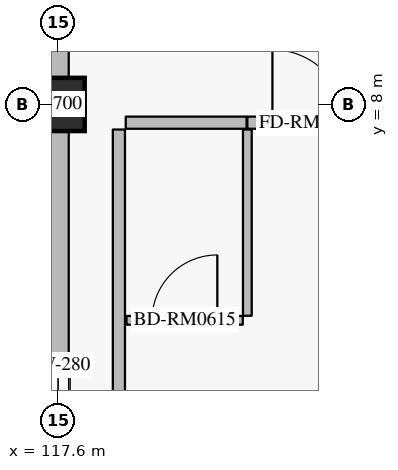
"""IFC4 building model, lengths in metres.
Left out: names, types, materials, properties, quantities, classifications, styles, units other than length and angle.
Written with IfcOpenShell. Run it as: python <this file> out.ifc"""

import sys

from ifc_helpers import new_model, si_unit, direction, frame, frame_2d, origin, origin_2d, place, context, subcontext, project, spatial, rectangle, extrude, element, fill, save


model = new_model("IFC4")
c1 = context("Model", 3, precision=1e-05, world=origin(), true_north=direction((0.0, 1.0)))
c2 = subcontext(c1, "Body", "Model", "MODEL_VIEW")
j1 = project(units=[si_unit("LENGTHUNIT", "METRE"), si_unit("PLANEANGLEUNIT", "RADIAN")], contexts=[c1])
p1 = place(None, origin())
s1 = spatial("IfcSite", under=j1, at=p1, CompositionType="ELEMENT")
p2 = place(p1, origin())
s2 = spatial("IfcBuilding", under=s1, at=p2, CompositionType="ELEMENT")
p3 = place(p2, frame((0.0, 0.0, 25.2)))
s3 = spatial("IfcBuildingStorey", under=s2, at=p3, CompositionType="ELEMENT", Elevation=25.2)
p4 = place(p3, frame((117.6, 8.0, 0.0), z_axis=(0.0, 0.0, 1.0), x_axis=(1.0, 0.0, 0.0)))
e1 = element("IfcColumn", 1, at=p4, inside=s3, PredefinedType="COLUMN", context=c2, shape_type="SweptSolid", body=[
    extrude(rectangle(XDim=0.7, YDim=0.7, at=origin_2d()), origin(), (0.0, 0.0, 1.0), 3.6),
])
p5 = place(p3, frame((117.6, 0.4, 0.0), z_axis=(0.0, 0.0, 1.0), x_axis=(0.0, 1.0, 0.0)))
e2 = element("IfcWall", 2, at=p5, inside=s3, PredefinedType="SOLIDWALL", context=c2, shape_type="SweptSolid", body=[
    extrude(rectangle(XDim=7.25, YDim=0.28, at=frame_2d((3.625, 0.0))), origin(), (0.0, 0.0, 1.0), 2.7),
])
p6 = place(p5, frame((2.975, 0.0, 0.5)))
e3 = element("IfcOpeningElement", 3, at=p6, cuts=e2, PredefinedType="OPENING", context=c2, shape_type="SweptSolid", body=[
    extrude(rectangle(XDim=1.3, YDim=1.65, at=frame_2d((0.65, 0.825))), frame((0.0, 0.15, 0.0), z_axis=(0.0, -1.0, 0.0), x_axis=(1.0, 0.0, 0.0)), (0.0, 0.0, 1.0), 0.3),
])
p7 = place(p3, frame((117.6, 8.35, 0.0), z_axis=(0.0, 0.0, 1.0), x_axis=(0.0, 1.0, 0.0)))
e4 = element("IfcWall", 4, at=p7, inside=s3, PredefinedType="SOLIDWALL", context=c2, shape_type="SweptSolid", body=[
    extrude(rectangle(XDim=7.2, YDim=0.28, at=frame_2d((3.6, 0.0))), origin(), (0.0, 0.0, 1.0), 2.7),
])
p8 = place(p7, frame((2.95, 0.0, 0.5)))
e5 = element("IfcOpeningElement", 5, at=p8, cuts=e4, PredefinedType="OPENING", context=c2, shape_type="SweptSolid", body=[
    extrude(rectangle(XDim=1.3, YDim=1.65, at=frame_2d((0.65, 0.825))), frame((0.0, 0.15, 0.0), z_axis=(0.0, -1.0, 0.0), x_axis=(1.0, 0.0, 0.0)), (0.0, 0.0, 1.0), 0.3),
])
p9 = place(p3, frame((118.49, 7.76, 0.0), z_axis=(0.0, 0.0, 1.0), x_axis=(1.0, 0.0, 0.0)))
e6 = element("IfcWall", 6, at=p9, inside=s3, PredefinedType="PARTITIONING", context=c2, shape_type="SweptSolid", body=[
    extrude(rectangle(XDim=1.59, YDim=0.16, at=frame_2d((0.795, 0.0))), origin(), (0.0, 0.0, 1.0), 3.335),
])
p10 = place(p3, frame((120.09, 7.76, 0.0), z_axis=(0.0, 0.0, 1.0), x_axis=(1.0, 0.0, 0.0)))
e7 = element("IfcWall", 7, at=p10, inside=s3, PredefinedType="PARTITIONING", context=c2, shape_type="SweptSolid", body=[
    extrude(rectangle(XDim=1.62, YDim=0.16, at=frame_2d((0.81, 0.0))), origin(), (0.0, 0.0, 1.0), 3.335),
])
p11 = place(p10, frame((0.33, 0.0, 0.0)))
e8 = element("IfcOpeningElement", 8, at=p11, cuts=e7, PredefinedType="OPENING", context=c2, shape_type="SweptSolid", body=[
    extrude(rectangle(XDim=0.96, YDim=2.2, at=frame_2d((0.48, 1.1))), frame((0.0, 0.09, 0.0), z_axis=(0.0, -1.0, 0.0), x_axis=(1.0, 0.0, 0.0)), (0.0, 0.0, 1.0), 0.18),
])
p12 = place(p3, frame((120.09, 5.22, 0.0), z_axis=(0.0, 0.0, 1.0), x_axis=(0.0, 1.0, 0.0)))
e9 = element("IfcWall", 9, at=p12, inside=s3, PredefinedType="PARTITIONING", context=c2, shape_type="SweptSolid", body=[
    extrude(rectangle(XDim=2.45, YDim=0.115, at=frame_2d((1.225, 0.0))), origin(), (0.0, 0.0, 1.0), 3.335),
])
p13 = place(p3, frame((118.5, 5.16, 0.0), z_axis=(0.0, 0.0, 1.0), x_axis=(1.0, 0.0, 0.0)))
e10 = element("IfcWall", 10, at=p13, inside=s3, PredefinedType="PARTITIONING", context=c2, shape_type="SweptSolid", body=[
    extrude(rectangle(XDim=1.53, YDim=0.115, at=frame_2d((0.765, 0.0))), origin(), (0.0, 0.0, 1.0), 3.335),
])
p14 = place(p13, frame((0.335, 0.0, 0.0)))
e11 = element("IfcOpeningElement", 11, at=p14, cuts=e10, PredefinedType="OPENING", context=c2, shape_type="SweptSolid", body=[
    extrude(rectangle(XDim=0.86, YDim=2.12, at=frame_2d((0.43, 1.06))), frame((0.0, 0.067, 0.0), z_axis=(0.0, -1.0, 0.0), x_axis=(1.0, 0.0, 0.0)), (0.0, 0.0, 1.0), 0.135),
])
p15 = place(p3, frame((118.4, 0.34, 0.0), z_axis=(0.0, 0.0, 1.0), x_axis=(0.0, 1.0, 0.0)))
e12 = element("IfcWall", 12, at=p15, inside=s3, PredefinedType="PARTITIONING", context=c2, shape_type="SweptSolid", body=[
    extrude(rectangle(XDim=7.33, YDim=0.16, at=frame_2d((3.665, 0.0))), origin(), (0.0, 0.0, 1.0), 3.335),
])
p16 = place(p6, origin())
e13 = element("IfcWindow", 13, at=p16, inside=s3, PartitioningType="SINGLE_PANEL", PredefinedType="WINDOW", context=c2, shape_type="SweptSolid", body=[
    extrude(rectangle(XDim=1.3, YDim=1.65, at=frame_2d((0.65, 0.825))), frame((0.0, 0.03, 0.0), z_axis=(0.0, -1.0, 0.0), x_axis=(1.0, 0.0, 0.0)), (0.0, 0.0, 1.0), 0.06),
])
fill(e3, e13)
p17 = place(p11, origin())
e14 = element("IfcDoor", 14, at=p17, inside=s3, OperationType="SINGLE_SWING_LEFT", PredefinedType="DOOR", context=c2, shape_type="SweptSolid", body=[
    extrude(rectangle(XDim=0.96, YDim=2.2, at=frame_2d((0.48, 1.1))), frame((0.0, 0.025, 0.0), z_axis=(0.0, -1.0, 0.0), x_axis=(1.0, 0.0, 0.0)), (0.0, 0.0, 1.0), 0.05),
])
fill(e8, e14)
p18 = place(p14, origin())
e15 = element("IfcDoor", 15, at=p18, inside=s3, OperationType="SINGLE_SWING_RIGHT", PredefinedType="DOOR", context=c2, shape_type="SweptSolid", body=[
    extrude(rectangle(XDim=0.86, YDim=2.12, at=frame_2d((0.43, 1.06))), frame((0.0, 0.025, 0.0), z_axis=(0.0, -1.0, 0.0), x_axis=(1.0, 0.0, 0.0)), (0.0, 0.0, 1.0), 0.05),
])
fill(e11, e15)
save(model, sys.argv[1])
